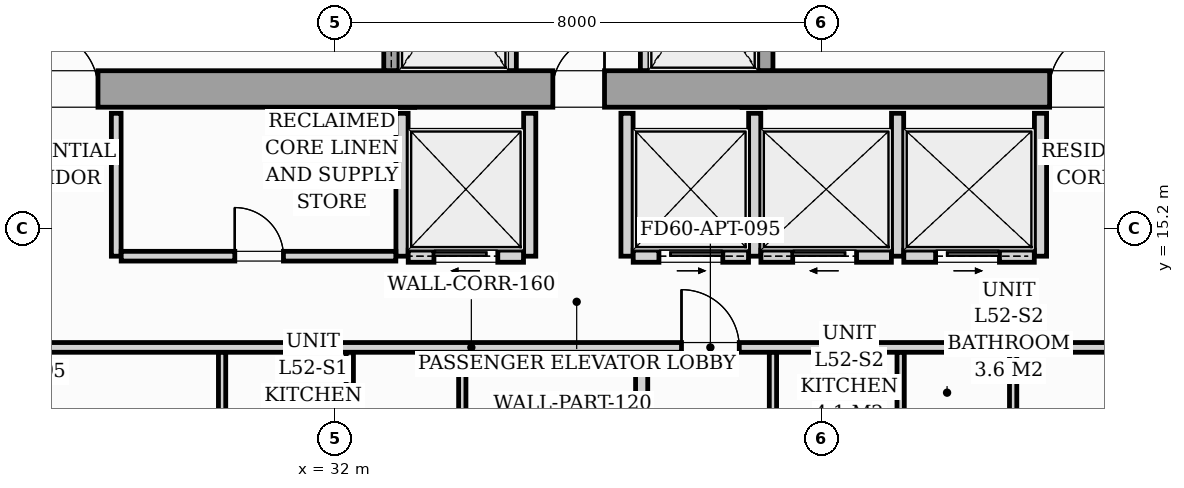
"""IFC4 building model, lengths in metres.
Left out: names, types, materials, properties, quantities, classifications, styles, units other than length and angle.
Written with IfcOpenShell. Run it as: python <this file> out.ifc"""

import sys

from ifc_helpers import new_model, si_unit, direction, frame, frame_2d, origin, origin_2d, place, context, subcontext, project, spatial, rectangle, i_section, extrude, source, transform, mapped, element, fill, save


model = new_model("IFC4")
c1 = context("Model", 3, precision=1e-05, world=origin(), true_north=direction((0.0, 1.0)))
c2 = subcontext(c1, "Body", "Model", "MODEL_VIEW")
j1 = project(units=[si_unit("LENGTHUNIT", "METRE"), si_unit("PLANEANGLEUNIT", "RADIAN")], contexts=[c1])
p1 = place(None, origin())
s1 = spatial("IfcSite", under=j1, at=p1, CompositionType="ELEMENT")
p2 = place(p1, origin())
s2 = spatial("IfcBuilding", under=s1, at=p2, CompositionType="ELEMENT")
p3 = place(p2, frame((0.0, 0.0, 182.6)))
s3 = spatial("IfcBuildingStorey", under=s2, at=p3, CompositionType="ELEMENT", Elevation=182.6)
m1 = source(origin(), c2, "Body", "SweptSolid", [
    extrude(i_section(OverallWidth=0.416, OverallDepth=0.446, WebThickness=0.039, FlangeThickness=0.063, FilletRadius=0.018, at=origin_2d()), origin(), (0.0, 0.0, 1.0), 3.196),
])
for number, where, z_axis, x_axis in (
    (1, (33.12, 17.4, 0.002), (0.0, 0.0, 1.0), (1.0, 0.0, 0.0)),
    (2, (38.88, 17.4, 0.002), (0.0, 0.0, 1.0), (1.0, 0.0, 0.0)),
):
    element("IfcColumn", number, at=place(p3, frame(where, z_axis=z_axis, x_axis=x_axis)), inside=s3, PredefinedType="PILASTER", context=c2, shape_type="MappedRepresentation", body=[
        mapped(m1, transform((0.0, 0.0, 0.0), scale=1.0)),
    ])
p4 = place(p3, frame((26.2, 17.5, 0.0), z_axis=(0.0, 0.0, 1.0), x_axis=(1.0, 0.0, 0.0)))
e3 = element("IfcWall", 3, at=p4, inside=s3, PredefinedType="SHEAR", context=c2, shape_type="SweptSolid", body=[
    extrude(rectangle(XDim=19.6, YDim=0.6, at=frame_2d((9.8, 0.0))), origin(), (0.0, 0.0, 1.0), 3.2),
])
p5 = place(p4, frame((0.95, 0.0, 0.0)))
e4 = element("IfcOpeningElement", 4, at=p5, cuts=e3, PredefinedType="OPENING", context=c2, shape_type="SweptSolid", body=[
    extrude(rectangle(XDim=0.95, YDim=2.06, at=frame_2d((0.475, 1.03))), frame((0.0, 0.31, 0.0), z_axis=(0.0, -1.0, 0.0), x_axis=(1.0, 0.0, 0.0)), (0.0, 0.0, 1.0), 0.62),
])
p6 = place(p4, frame((9.38, 0.0, 0.0)))
e5 = element("IfcOpeningElement", 5, at=p6, cuts=e3, PredefinedType="OPENING", context=c2, shape_type="SweptSolid", body=[
    extrude(rectangle(XDim=0.85, YDim=2.0, at=frame_2d((0.425, 1.0))), frame((0.0, 0.31, 0.0), z_axis=(0.0, -1.0, 0.0), x_axis=(1.0, 0.0, 0.0)), (0.0, 0.0, 1.0), 0.62),
])
p7 = place(p4, frame((17.55, 0.0, 0.0)))
e6 = element("IfcOpeningElement", 6, at=p7, cuts=e3, PredefinedType="OPENING", context=c2, shape_type="SweptSolid", body=[
    extrude(rectangle(XDim=0.95, YDim=2.06, at=frame_2d((0.475, 1.03))), frame((0.0, 0.31, 0.0), z_axis=(0.0, -1.0, 0.0), x_axis=(1.0, 0.0, 0.0)), (0.0, 0.0, 1.0), 0.62),
])
p8 = place(p3, frame((32.925, 17.802, 0.0), z_axis=(0.0, 0.0, 1.0), x_axis=(0.0, 1.0, 0.0)))
e7 = element("IfcWall", 7, at=p8, inside=s3, PredefinedType="SOLIDWALL", context=c2, shape_type="SweptSolid", body=[
    extrude(rectangle(XDim=2.646, YDim=0.25, at=frame_2d((1.323, 0.0))), origin(), (0.0, 0.0, 1.0), 3.2),
])
p9 = place(p8, frame((0.548, 0.0, 0.0)))
e8 = element("IfcOpeningElement", 8, at=p9, cuts=e7, PredefinedType="OPENING", context=c2, shape_type="SweptSolid", body=[
    extrude(rectangle(XDim=1.1, YDim=2.08, at=frame_2d((0.55, 1.04))), frame((0.0, 0.135, 0.0), z_axis=(0.0, -1.0, 0.0), x_axis=(1.0, 0.0, 0.0)), (0.0, 0.0, 1.0), 0.27),
])
for number, where, z_axis, x_axis in (
    (9, (34.9, 17.802, 0.0), (0.0, 0.0, 1.0), (0.0, 1.0, 0.0)),
    (10, (37.1, 17.802, 0.0), (0.0, 0.0, 1.0), (0.0, 1.0, 0.0)),
):
    element("IfcWall", number, at=place(p3, frame(where, z_axis=z_axis, x_axis=x_axis)), inside=s3, PredefinedType="PARTITIONING", context=c2, shape_type="SweptSolid", body=[
        extrude(rectangle(XDim=2.646, YDim=0.16, at=frame_2d((1.323, 0.0))), origin(), (0.0, 0.0, 1.0), 2.94),
    ])
p10 = place(p3, frame((39.075, 17.802, 0.0), z_axis=(0.0, 0.0, 1.0), x_axis=(0.0, 1.0, 0.0)))
e11 = element("IfcWall", 11, at=p10, inside=s3, PredefinedType="SOLIDWALL", context=c2, shape_type="SweptSolid", body=[
    extrude(rectangle(XDim=2.646, YDim=0.25, at=frame_2d((1.323, 0.0))), origin(), (0.0, 0.0, 1.0), 3.2),
])
p11 = place(p10, frame((0.548, 0.0, 0.0)))
e12 = element("IfcOpeningElement", 12, at=p11, cuts=e11, PredefinedType="OPENING", context=c2, shape_type="SweptSolid", body=[
    extrude(rectangle(XDim=1.1, YDim=2.08, at=frame_2d((0.55, 1.04))), frame((0.0, 0.135, 0.0), z_axis=(0.0, -1.0, 0.0), x_axis=(1.0, 0.0, 0.0)), (0.0, 0.0, 1.0), 0.27),
])
p12 = place(p3, frame((28.4, 14.75, 0.0), z_axis=(0.0, 0.0, 1.0), x_axis=(0.0, 1.0, 0.0)))
e13 = element("IfcWall", 13, at=p12, inside=s3, PredefinedType="PARTITIONING", context=c2, shape_type="SweptSolid", body=[
    extrude(rectangle(XDim=2.35, YDim=0.16, at=frame_2d((1.175, 0.0))), origin(), (0.0, 0.0, 1.0), 2.94),
])
p13 = place(p3, frame((33.1, 14.75, 0.0), z_axis=(0.0, 0.0, 1.0), x_axis=(0.0, 1.0, 0.0)))
e14 = element("IfcWall", 14, at=p13, inside=s3, PredefinedType="PARTITIONING", context=c2, shape_type="SweptSolid", body=[
    extrude(rectangle(XDim=2.35, YDim=0.2, at=frame_2d((1.175, 0.0))), origin(), (0.0, 0.0, 1.0), 2.94),
])
p14 = place(p3, frame((28.482, 14.75, 0.0), z_axis=(0.0, 0.0, 1.0), x_axis=(1.0, 0.0, 0.0)))
e15 = element("IfcWall", 15, at=p14, inside=s3, PredefinedType="PARTITIONING", context=c2, shape_type="SweptSolid", body=[
    extrude(rectangle(XDim=4.516, YDim=0.16, at=frame_2d((2.258, 0.0))), origin(), (0.0, 0.0, 1.0), 2.94),
])
p15 = place(p14, frame((1.868, 0.0, 0.0)))
e16 = element("IfcOpeningElement", 16, at=p15, cuts=e15, PredefinedType="OPENING", context=c2, shape_type="SweptSolid", body=[
    extrude(rectangle(XDim=0.8, YDim=2.05, at=frame_2d((0.4, 1.025))), frame((0.0, 0.09, 0.0), z_axis=(0.0, -1.0, 0.0), x_axis=(1.0, 0.0, 0.0)), (0.0, 0.0, 1.0), 0.18),
])
p16 = place(p3, frame((35.2, 14.75, 0.0), z_axis=(0.0, 0.0, 1.0), x_axis=(0.0, 1.0, 0.0)))
e17 = element("IfcWall", 17, at=p16, inside=s3, PredefinedType="PARTITIONING", context=c2, shape_type="SweptSolid", body=[
    extrude(rectangle(XDim=2.35, YDim=0.2, at=frame_2d((1.175, 0.0))), origin(), (0.0, 0.0, 1.0), 2.94),
])
p17 = place(p3, frame((33.202, 14.75, 0.0), z_axis=(0.0, 0.0, 1.0), x_axis=(1.0, 0.0, 0.0)))
e18 = element("IfcWall", 18, at=p17, inside=s3, PredefinedType="PARTITIONING", context=c2, shape_type="SweptSolid", body=[
    extrude(rectangle(XDim=1.896, YDim=0.2, at=frame_2d((0.948, 0.0))), origin(), (0.0, 0.0, 1.0), 2.94),
])
p18 = place(p17, frame((0.423, 0.0, 0.0)))
e19 = element("IfcOpeningElement", 19, at=p18, cuts=e18, PredefinedType="OPENING", context=c2, shape_type="SweptSolid", body=[
    extrude(rectangle(XDim=1.05, YDim=2.08, at=frame_2d((0.525, 1.04))), frame((0.0, 0.11, 0.0), z_axis=(0.0, -1.0, 0.0), x_axis=(1.0, 0.0, 0.0)), (0.0, 0.0, 1.0), 0.22),
])
for number, where, z_axis, x_axis in (
    (20, (36.8, 14.75, 0.0), (0.0, 0.0, 1.0), (0.0, 1.0, 0.0)),
    (21, (38.9, 14.75, 0.0), (0.0, 0.0, 1.0), (0.0, 1.0, 0.0)),
):
    element("IfcWall", number, at=place(p3, frame(where, z_axis=z_axis, x_axis=x_axis)), inside=s3, PredefinedType="PARTITIONING", context=c2, shape_type="SweptSolid", body=[
        extrude(rectangle(XDim=2.35, YDim=0.2, at=frame_2d((1.175, 0.0))), origin(), (0.0, 0.0, 1.0), 2.94),
    ])
p19 = place(p3, frame((36.902, 14.75, 0.0), z_axis=(0.0, 0.0, 1.0), x_axis=(1.0, 0.0, 0.0)))
e22 = element("IfcWall", 22, at=p19, inside=s3, PredefinedType="PARTITIONING", context=c2, shape_type="SweptSolid", body=[
    extrude(rectangle(XDim=1.896, YDim=0.2, at=frame_2d((0.948, 0.0))), origin(), (0.0, 0.0, 1.0), 2.94),
])
p20 = place(p19, frame((0.423, 0.0, 0.0)))
e23 = element("IfcOpeningElement", 23, at=p20, cuts=e22, PredefinedType="OPENING", context=c2, shape_type="SweptSolid", body=[
    extrude(rectangle(XDim=1.05, YDim=2.08, at=frame_2d((0.525, 1.04))), frame((0.0, 0.11, 0.0), z_axis=(0.0, -1.0, 0.0), x_axis=(1.0, 0.0, 0.0)), (0.0, 0.0, 1.0), 0.22),
])
for number, where, z_axis, x_axis in (
    (24, (41.25, 14.75, 0.0), (0.0, 0.0, 1.0), (0.0, 1.0, 0.0)),
    (25, (43.6, 14.75, 0.0), (0.0, 0.0, 1.0), (0.0, 1.0, 0.0)),
):
    element("IfcWall", number, at=place(p3, frame(where, z_axis=z_axis, x_axis=x_axis)), inside=s3, PredefinedType="PARTITIONING", context=c2, shape_type="SweptSolid", body=[
        extrude(rectangle(XDim=2.35, YDim=0.2, at=frame_2d((1.175, 0.0))), origin(), (0.0, 0.0, 1.0), 2.94),
    ])
p21 = place(p3, frame((39.002, 14.75, 0.0), z_axis=(0.0, 0.0, 1.0), x_axis=(1.0, 0.0, 0.0)))
e26 = element("IfcWall", 26, at=p21, inside=s3, PredefinedType="PARTITIONING", context=c2, shape_type="SweptSolid", body=[
    extrude(rectangle(XDim=2.146, YDim=0.2, at=frame_2d((1.073, 0.0))), origin(), (0.0, 0.0, 1.0), 2.94),
])
p22 = place(p21, frame((0.523, 0.0, 0.0)))
e27 = element("IfcOpeningElement", 27, at=p22, cuts=e26, PredefinedType="OPENING", context=c2, shape_type="SweptSolid", body=[
    extrude(rectangle(XDim=1.05, YDim=2.08, at=frame_2d((0.525, 1.04))), frame((0.0, 0.11, 0.0), z_axis=(0.0, -1.0, 0.0), x_axis=(1.0, 0.0, 0.0)), (0.0, 0.0, 1.0), 0.22),
])
p23 = place(p3, frame((41.352, 14.75, 0.0), z_axis=(0.0, 0.0, 1.0), x_axis=(1.0, 0.0, 0.0)))
e28 = element("IfcWall", 28, at=p23, inside=s3, PredefinedType="PARTITIONING", context=c2, shape_type="SweptSolid", body=[
    extrude(rectangle(XDim=2.146, YDim=0.2, at=frame_2d((1.073, 0.0))), origin(), (0.0, 0.0, 1.0), 2.94),
])
p24 = place(p23, frame((0.523, 0.0, 0.0)))
e29 = element("IfcOpeningElement", 29, at=p24, cuts=e28, PredefinedType="OPENING", context=c2, shape_type="SweptSolid", body=[
    extrude(rectangle(XDim=1.05, YDim=2.08, at=frame_2d((0.525, 1.04))), frame((0.0, 0.11, 0.0), z_axis=(0.0, -1.0, 0.0), x_axis=(1.0, 0.0, 0.0)), (0.0, 0.0, 1.0), 0.22),
])
p25 = place(p3, frame((22.6, 13.25, 0.0), z_axis=(0.0, 0.0, 1.0), x_axis=(1.0, 0.0, 0.0)))
e30 = element("IfcWall", 30, at=p25, inside=s3, PredefinedType="PARTITIONING", context=c2, shape_type="SweptSolid", body=[
    extrude(rectangle(XDim=23.28, YDim=0.16, at=frame_2d((11.64, 0.0))), origin(), (0.0, 0.0, 1.0), 2.94),
])
p26 = place(p25, frame((3.335, 0.0, 0.0)))
e31 = element("IfcOpeningElement", 31, at=p26, cuts=e30, PredefinedType="OPENING", context=c2, shape_type="SweptSolid", body=[
    extrude(rectangle(XDim=0.95, YDim=2.06, at=frame_2d((0.475, 1.03))), frame((0.0, 0.09, 0.0), z_axis=(0.0, -1.0, 0.0), x_axis=(1.0, 0.0, 0.0)), (0.0, 0.0, 1.0), 0.18),
])
p27 = place(p25, frame((15.096, 0.0, 0.0)))
e32 = element("IfcOpeningElement", 32, at=p27, cuts=e30, PredefinedType="OPENING", context=c2, shape_type="SweptSolid", body=[
    extrude(rectangle(XDim=0.95, YDim=2.06, at=frame_2d((0.475, 1.03))), frame((0.0, 0.09, 0.0), z_axis=(0.0, -1.0, 0.0), x_axis=(1.0, 0.0, 0.0)), (0.0, 0.0, 1.0), 0.18),
])
p28 = place(p3, frame((34.091, 7.846, 0.0), z_axis=(0.0, 0.0, 1.0), x_axis=(0.0, 1.0, 0.0)))
e33 = element("IfcWall", 33, at=p28, inside=s3, PredefinedType="PARTITIONING", context=c2, shape_type="SweptSolid", body=[
    extrude(rectangle(XDim=5.322, YDim=0.12, at=frame_2d((2.661, 0.0))), origin(), (0.0, 0.0, 1.0), 2.94),
])
p29 = place(p28, frame((2.176, 0.0, 0.0)))
e34 = element("IfcOpeningElement", 34, at=p29, cuts=e33, PredefinedType="OPENING", context=c2, shape_type="SweptSolid", body=[
    extrude(rectangle(XDim=0.9, YDim=2.05, at=frame_2d((0.45, 1.025))), frame((0.0, 0.07, 0.0), z_axis=(0.0, -1.0, 0.0), x_axis=(1.0, 0.0, 0.0)), (0.0, 0.0, 1.0), 0.14),
])
for number, where, z_axis, x_axis in (
    (35, (32.241, 11.062, 0.0), (0.0, 0.0, 1.0), (0.0, 1.0, 0.0)),
    (36, (30.141, 11.062, 0.0), (0.0, 0.0, 1.0), (0.0, 1.0, 0.0)),
):
    element("IfcWall", number, at=place(p3, frame(where, z_axis=z_axis, x_axis=x_axis)), inside=s3, PredefinedType="PARTITIONING", context=c2, shape_type="SweptSolid", body=[
        extrude(rectangle(XDim=2.106, YDim=0.12, at=frame_2d((1.053, 0.0))), origin(), (0.0, 0.0, 1.0), 2.94),
    ])
p30 = place(p3, frame((37.041, 8.13, 0.0), z_axis=(0.0, 0.0, 1.0), x_axis=(0.0, 1.0, 0.0)))
e37 = element("IfcWall", 37, at=p30, inside=s3, PredefinedType="PARTITIONING", context=c2, shape_type="SweptSolid", body=[
    extrude(rectangle(XDim=5.038, YDim=0.2, at=frame_2d((2.519, 0.0))), origin(), (0.0, 0.0, 1.0), 2.94),
])
p31 = place(p3, frame((43.15, 8.718, 0.0), z_axis=(0.0, 0.0, 1.0), x_axis=(0.0, 1.0, 0.0)))
e38 = element("IfcWall", 38, at=p31, inside=s3, PredefinedType="PARTITIONING", context=c2, shape_type="SweptSolid", body=[
    extrude(rectangle(XDim=4.45, YDim=0.12, at=frame_2d((2.225, 0.0))), origin(), (0.0, 0.0, 1.0), 2.94),
])
p32 = place(p31, frame((2.386, 0.0, 0.0)))
e39 = element("IfcOpeningElement", 39, at=p32, cuts=e38, PredefinedType="OPENING", context=c2, shape_type="SweptSolid", body=[
    extrude(rectangle(XDim=0.9, YDim=2.05, at=frame_2d((0.45, 1.025))), frame((0.0, 0.07, 0.0), z_axis=(0.0, -1.0, 0.0), x_axis=(1.0, 0.0, 0.0)), (0.0, 0.0, 1.0), 0.14),
])
p33 = place(p3, frame((41.3, 11.09, 0.0), z_axis=(0.0, 0.0, 1.0), x_axis=(0.0, 1.0, 0.0)))
e40 = element("IfcWall", 40, at=p33, inside=s3, PredefinedType="PARTITIONING", context=c2, shape_type="SweptSolid", body=[
    extrude(rectangle(XDim=2.078, YDim=0.12, at=frame_2d((1.039, 0.0))), origin(), (0.0, 0.0, 1.0), 2.94),
])
p34 = place(p3, frame((39.2, 11.09, 0.0), z_axis=(0.0, 0.0, 1.0), x_axis=(0.0, 1.0, 0.0)))
e41 = element("IfcWall", 41, at=p34, inside=s3, PredefinedType="PARTITIONING", context=c2, shape_type="SweptSolid", body=[
    extrude(rectangle(XDim=2.078, YDim=0.12, at=frame_2d((1.039, 0.0))), origin(), (0.0, 0.0, 1.0), 2.94),
])
p35 = place(p34, frame((0.18, 0.0, 0.0)))
e42 = element("IfcOpeningElement", 42, at=p35, cuts=e41, PredefinedType="OPENING", context=c2, shape_type="SweptSolid", body=[
    extrude(rectangle(XDim=0.85, YDim=2.05, at=frame_2d((0.425, 1.025))), frame((0.0, 0.07, 0.0), z_axis=(0.0, -1.0, 0.0), x_axis=(1.0, 0.0, 0.0)), (0.0, 0.0, 1.0), 0.14),
])
m2 = source(origin(), c2, "Body", "SweptSolid", [
    extrude(rectangle(XDim=0.95, YDim=2.06, at=frame_2d((0.475, 1.03))), frame((0.0, 0.025, 0.0), z_axis=(0.0, -1.0, 0.0), x_axis=(1.0, 0.0, 0.0)), (0.0, 0.0, 1.0), 0.05),
])
p36 = place(p5, origin())
e43 = element("IfcDoor", 43, at=p36, inside=s3, OperationType="SINGLE_SWING_LEFT", PredefinedType="DOOR", context=c2, shape_type="MappedRepresentation", body=[
    mapped(m2, transform((0.0, 0.0, 0.0), scale=1.0)),
])
fill(e4, e43)
m3 = source(origin(), c2, "Body", "SweptSolid", [
    extrude(rectangle(XDim=0.85, YDim=2.0, at=frame_2d((0.425, 1.0))), frame((0.0, 0.025, 0.0), z_axis=(0.0, -1.0, 0.0), x_axis=(1.0, 0.0, 0.0)), (0.0, 0.0, 1.0), 0.05),
])
p37 = place(p6, origin())
e44 = element("IfcDoor", 44, at=p37, inside=s3, OperationType="SINGLE_SWING_RIGHT", PredefinedType="DOOR", context=c2, shape_type="MappedRepresentation", body=[
    mapped(m3, transform((0.0, 0.0, 0.0), scale=1.0)),
])
fill(e5, e44)
p38 = place(p7, origin())
e45 = element("IfcDoor", 45, at=p38, inside=s3, OperationType="SINGLE_SWING_RIGHT", PredefinedType="DOOR", context=c2, shape_type="MappedRepresentation", body=[
    mapped(m2, transform((0.0, 0.0, 0.0), scale=1.0)),
])
fill(e6, e45)
m4 = source(origin(), c2, "Body", "SweptSolid", [
    extrude(rectangle(XDim=0.8, YDim=2.05, at=frame_2d((0.4, 1.025))), frame((0.0, 0.025, 0.0), z_axis=(0.0, -1.0, 0.0), x_axis=(1.0, 0.0, 0.0)), (0.0, 0.0, 1.0), 0.05),
])
p39 = place(p15, origin())
e46 = element("IfcDoor", 46, at=p39, inside=s3, OperationType="SINGLE_SWING_LEFT", PredefinedType="DOOR", context=c2, shape_type="MappedRepresentation", body=[
    mapped(m4, transform((0.0, 0.0, 0.0), scale=1.0)),
])
fill(e16, e46)
m5 = source(origin(), c2, "Body", "SweptSolid", [
    extrude(rectangle(XDim=1.05, YDim=2.08, at=frame_2d((0.525, 1.04))), frame((0.0, 0.025, 0.0), z_axis=(0.0, -1.0, 0.0), x_axis=(1.0, 0.0, 0.0)), (0.0, 0.0, 1.0), 0.05),
])
p40 = place(p18, origin())
e47 = element("IfcDoor", 47, at=p40, inside=s3, OperationType="SLIDING_TO_LEFT", PredefinedType="DOOR", context=c2, shape_type="MappedRepresentation", body=[
    mapped(m5, transform((0.0, 0.0, 0.0), scale=1.0)),
])
fill(e19, e47)
p41 = place(p20, origin())
e48 = element("IfcDoor", 48, at=p41, inside=s3, OperationType="SLIDING_TO_RIGHT", PredefinedType="DOOR", context=c2, shape_type="MappedRepresentation", body=[
    mapped(m5, transform((0.0, 0.0, 0.0), scale=1.0)),
])
fill(e23, e48)
p42 = place(p22, origin())
e49 = element("IfcDoor", 49, at=p42, inside=s3, OperationType="SLIDING_TO_LEFT", PredefinedType="DOOR", context=c2, shape_type="MappedRepresentation", body=[
    mapped(m5, transform((0.0, 0.0, 0.0), scale=1.0)),
])
fill(e27, e49)
p43 = place(p24, origin())
e50 = element("IfcDoor", 50, at=p43, inside=s3, OperationType="SLIDING_TO_RIGHT", PredefinedType="DOOR", context=c2, shape_type="MappedRepresentation", body=[
    mapped(m5, transform((0.0, 0.0, 0.0), scale=1.0)),
])
fill(e29, e50)
m6 = source(origin(), c2, "Body", "SweptSolid", [
    extrude(rectangle(XDim=0.95, YDim=2.06, at=frame_2d((0.475, 1.03))), frame((0.0, 0.025, 0.0), z_axis=(0.0, -1.0, 0.0), x_axis=(1.0, 0.0, 0.0)), (0.0, 0.0, 1.0), 0.05),
])
p44 = place(p27, origin())
e51 = element("IfcDoor", 51, at=p44, inside=s3, OperationType="SINGLE_SWING_LEFT", PredefinedType="DOOR", context=c2, shape_type="MappedRepresentation", body=[
    mapped(m6, transform((0.0, 0.0, 0.0), scale=1.0)),
])
fill(e32, e51)
save(model, sys.argv[1])
